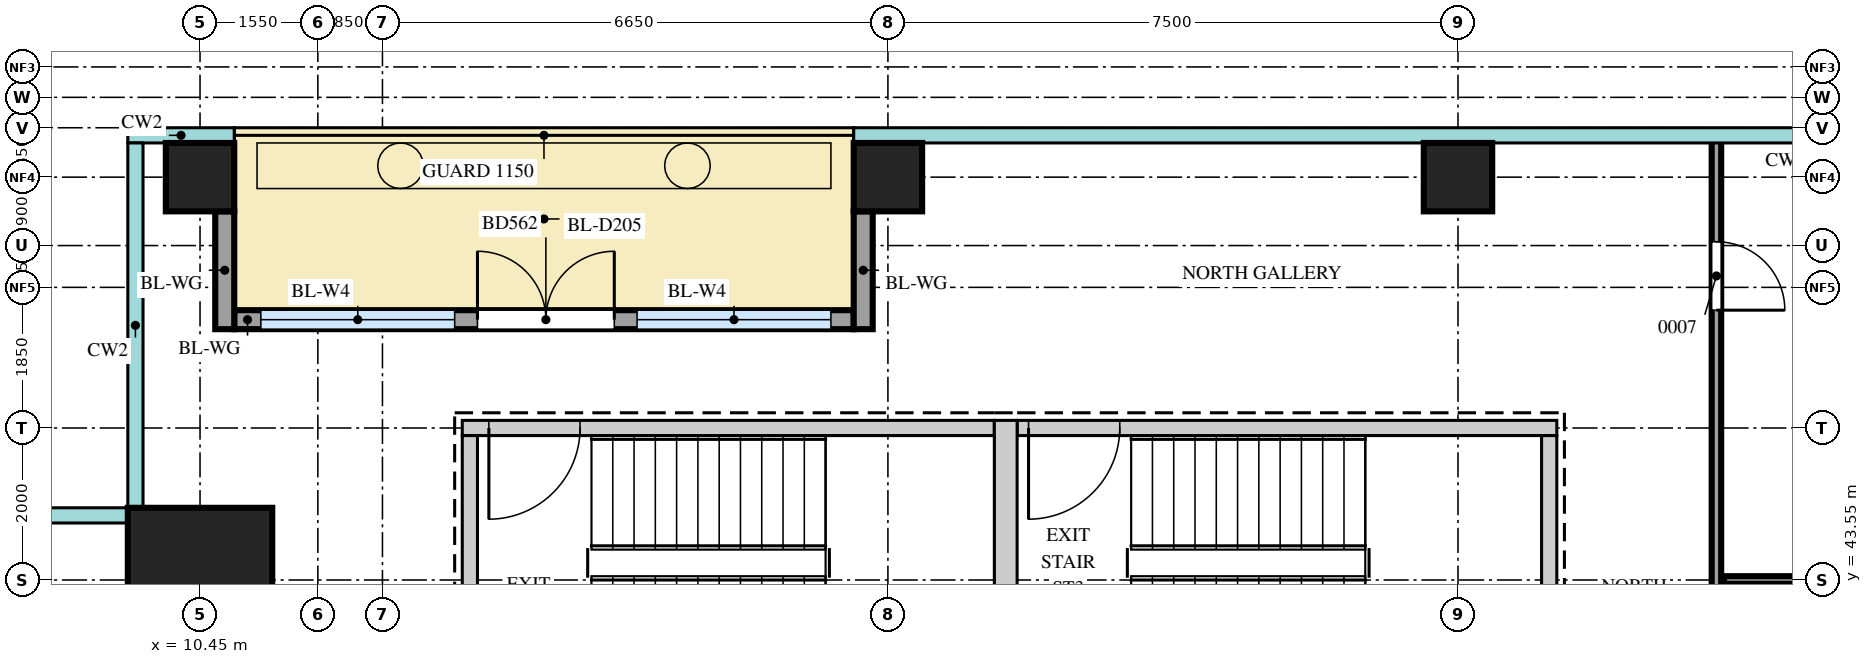
"""IFC4 building model, lengths in metres.
Left out: names, types, materials, properties, quantities, classifications, styles, units other than length and angle.
Written with IfcOpenShell. Run it as: python <this file> out.ifc"""

import sys

from ifc_helpers import new_model, si_unit, direction, frame, frame_2d, origin, origin_2d, place, context, subcontext, project, spatial, rectangle, extrude, source, transform, mapped, element, fill, save


model = new_model("IFC4")
c1 = context("Model", 3, precision=1e-05, world=origin(), true_north=direction((0.0, 1.0)))
c2 = subcontext(c1, "Body", "Model", "MODEL_VIEW")
j1 = project(units=[si_unit("LENGTHUNIT", "METRE"), si_unit("PLANEANGLEUNIT", "RADIAN")], contexts=[c1])
p1 = place(None, origin())
s1 = spatial("IfcSite", under=j1, at=p1, CompositionType="ELEMENT")
p2 = place(p1, origin())
s2 = spatial("IfcBuilding", under=s1, at=p2, CompositionType="ELEMENT")
p3 = place(p2, frame((0.0, 0.0, 250.2)))
s3 = spatial("IfcBuildingStorey", under=s2, at=p3, CompositionType="ELEMENT", Elevation=250.2)
m1 = source(origin(), c2, "Body", "SweptSolid", [
    extrude(rectangle(XDim=7.0, YDim=0.2, at=frame_2d((3.5, 0.0))), origin(), (0.0, 0.0, 1.0), 3.75),
])
p4 = place(p3, frame((13.9, 45.55, 0.0), z_axis=(0.0, 0.0, 1.0), x_axis=(1.0, 0.0, 0.0)))
e1 = element("IfcWall", 1, at=p4, inside=s3, PredefinedType="SHEAR", context=c2, shape_type="MappedRepresentation", body=[
    mapped(m1, transform((0.0, 0.0, 0.0))),
])
m2 = source(origin(), c2, "Body", "SweptSolid", [
    extrude(rectangle(XDim=1.2, YDim=2.1, at=frame_2d((0.6, 1.05))), frame((0.0, 0.11, 0.0), z_axis=(0.0, -1.0, 0.0), x_axis=(1.0, 0.0, 0.0)), (0.0, 0.0, 1.0), 0.22),
])
p5 = place(p4, frame((0.35, 0.0, 0.0)))
e2 = element("IfcOpeningElement", 2, at=p5, cuts=e1, PredefinedType="OPENING", context=c2, shape_type="MappedRepresentation", body=[
    mapped(m2, transform((0.0, 0.0, 0.0))),
])
m3 = source(origin(), c2, "Body", "SweptSolid", [
    extrude(rectangle(XDim=7.1, YDim=0.2, at=frame_2d((3.55, 0.0))), origin(), (0.0, 0.0, 1.0), 3.75),
])
p6 = place(p3, frame((21.2, 45.55, 0.0), z_axis=(0.0, 0.0, 1.0), x_axis=(1.0, 0.0, 0.0)))
e3 = element("IfcWall", 3, at=p6, inside=s3, PredefinedType="SHEAR", context=c2, shape_type="MappedRepresentation", body=[
    mapped(m3, transform((0.0, 0.0, 0.0))),
])
p7 = place(p6, frame((0.15, 0.0, 0.0)))
e4 = element("IfcOpeningElement", 4, at=p7, cuts=e3, PredefinedType="OPENING", context=c2, shape_type="MappedRepresentation", body=[
    mapped(m2, transform((0.0, 0.0, 0.0))),
])
m4 = source(origin(), c2, "Body", "SweptSolid", [
    extrude(rectangle(XDim=3.75, YDim=0.3, at=frame_2d((1.875, 0.0))), origin(), (0.0, 0.0, 1.0), 3.75),
])
p8 = place(p3, frame((21.05, 41.9, 0.0), z_axis=(0.0, 0.0, 1.0), x_axis=(0.0, 1.0, 0.0)))
e5 = element("IfcWall", 5, at=p8, inside=s3, PredefinedType="SHEAR", context=c2, shape_type="MappedRepresentation", body=[
    mapped(m4, transform((0.0, 0.0, 0.0))),
])
m5 = source(origin(), c2, "Body", "SweptSolid", [
    extrude(rectangle(XDim=3.35, YDim=0.2, at=frame_2d((1.675, 0.0))), origin(), (0.0, 0.0, 1.0), 3.75),
])
for number, where, z_axis, x_axis in (
    (6, (14.0, 42.1, 0.0), (0.0, 0.0, 1.0), (0.0, 1.0, 0.0)),
    (7, (28.2, 42.1, 0.0), (0.0, 0.0, 1.0), (0.0, 1.0, 0.0)),
):
    element("IfcWall", number, at=place(p3, frame(where, z_axis=z_axis, x_axis=x_axis)), inside=s3, PredefinedType="SHEAR", context=c2, shape_type="MappedRepresentation", body=[
        mapped(m5, transform((0.0, 0.0, 0.0))),
    ])
m6 = source(origin(), c2, "Body", "SweptSolid", [
    extrude(rectangle(XDim=1.9, YDim=1.9, at=origin_2d()), origin(), (0.0, 0.0, 1.0), 4.0),
])
p9 = place(p3, frame((10.45, 43.55, 0.0), z_axis=(0.0, 0.0, 1.0), x_axis=(1.0, 0.0, 0.0)))
e8 = element("IfcColumn", 8, at=p9, inside=s3, PredefinedType="COLUMN", context=c2, shape_type="MappedRepresentation", body=[
    mapped(m6, transform((0.0, 0.0, 0.0))),
])
m7 = source(origin(), c2, "Body", "SweptSolid", [
    extrude(rectangle(XDim=0.9, YDim=0.9, at=origin_2d()), origin(), (0.0, 0.0, 1.0), 3.75),
])
for number, where, z_axis, x_axis in (
    (9, (10.45, 48.85, 0.0), (0.0, 0.0, 1.0), (1.0, 0.0, 0.0)),
    (10, (19.5, 48.85, 0.0), (0.0, 0.0, 1.0), (1.0, 0.0, 0.0)),
    (11, (27.0, 48.85, 0.0), (0.0, 0.0, 1.0), (1.0, 0.0, 0.0)),
):
    element("IfcColumn", number, at=place(p3, frame(where, z_axis=z_axis, x_axis=x_axis)), inside=s3, PredefinedType="COLUMN", context=c2, shape_type="MappedRepresentation", body=[
        mapped(m7, transform((0.0, 0.0, 0.0))),
    ])
m8 = source(origin(), c2, "Body", "SweptSolid", [
    extrude(rectangle(XDim=8.15, YDim=0.25, at=frame_2d((4.075, 0.0))), origin(), (0.0, 0.0, 1.0), 3.35),
])
p10 = place(p3, frame((10.9, 46.975, 0.0), z_axis=(0.0, 0.0, 1.0), x_axis=(1.0, 0.0, 0.0)))
e12 = element("IfcWall", 12, at=p10, inside=s3, PredefinedType="SOLIDWALL", context=c2, shape_type="MappedRepresentation", body=[
    mapped(m8, transform((0.0, 0.0, 0.0))),
])
m9 = source(origin(), c2, "Body", "SweptSolid", [
    extrude(rectangle(XDim=2.55, YDim=2.4, at=frame_2d((1.275, 1.2))), frame((0.0, 0.135, 0.0), z_axis=(0.0, -1.0, 0.0), x_axis=(1.0, 0.0, 0.0)), (0.0, 0.0, 1.0), 0.27),
])
p11 = place(p10, frame((0.35, 0.0, 0.0)))
e13 = element("IfcOpeningElement", 13, at=p11, cuts=e12, PredefinedType="OPENING", context=c2, shape_type="MappedRepresentation", body=[
    mapped(m9, transform((0.0, 0.0, 0.0))),
])
p12 = place(p10, frame((5.3, 0.0, 0.0)))
e14 = element("IfcOpeningElement", 14, at=p12, cuts=e12, PredefinedType="OPENING", context=c2, shape_type="MappedRepresentation", body=[
    mapped(m9, transform((0.0, 0.0, 0.0))),
])
m10 = source(origin(), c2, "Body", "SweptSolid", [
    extrude(rectangle(XDim=1.8, YDim=2.4, at=frame_2d((0.9, 1.2))), frame((0.0, 0.135, 0.0), z_axis=(0.0, -1.0, 0.0), x_axis=(1.0, 0.0, 0.0)), (0.0, 0.0, 1.0), 0.27),
])
p13 = place(p10, frame((3.2, 0.0, 0.0)))
e15 = element("IfcOpeningElement", 15, at=p13, cuts=e12, PredefinedType="OPENING", context=c2, shape_type="MappedRepresentation", body=[
    mapped(m10, transform((0.0, 0.0, 0.0))),
])
m11 = source(origin(), c2, "Body", "SweptSolid", [
    extrude(rectangle(XDim=1.55, YDim=0.25, at=frame_2d((0.775, 0.0))), origin(), (0.0, 0.0, 1.0), 3.35),
])
for number, where, z_axis, x_axis in (
    (16, (10.775, 48.4, 0.0), (0.0, 0.0, 1.0), (0.0, -1.0, 0.0)),
    (17, (19.175, 48.4, 0.0), (0.0, 0.0, 1.0), (0.0, -1.0, 0.0)),
):
    element("IfcWall", number, at=place(p3, frame(where, z_axis=z_axis, x_axis=x_axis)), inside=s3, PredefinedType="SOLIDWALL", context=c2, shape_type="MappedRepresentation", body=[
        mapped(m11, transform((0.0, 0.0, 0.0))),
    ])
m12 = source(origin(), c2, "Body", "SweptSolid", [
    extrude(rectangle(XDim=10.25, YDim=0.125, at=frame_2d((5.125, 0.0))), origin(), (0.0, 0.0, 1.0), 3.8),
])
p14 = place(p3, frame((30.4, 39.1, 0.0), z_axis=(0.0, 0.0, 1.0), x_axis=(0.0, 1.0, 0.0)))
e18 = element("IfcWall", 18, at=p14, inside=s3, PredefinedType="PARTITIONING", context=c2, shape_type="MappedRepresentation", body=[
    mapped(m12, transform((0.0, 0.0, 0.0))),
])
m13 = source(origin(), c2, "Body", "SweptSolid", [
    extrude(rectangle(XDim=0.9, YDim=2.1, at=frame_2d((0.45, 1.05))), frame((0.0, 0.073, 0.0), z_axis=(0.0, -1.0, 0.0), x_axis=(1.0, 0.0, 0.0)), (0.0, 0.0, 1.0), 0.145),
])
p15 = place(p14, frame((8.0, 0.0, 0.0)))
e19 = element("IfcOpeningElement", 19, at=p15, cuts=e18, PredefinedType="OPENING", context=c2, shape_type="MappedRepresentation", body=[
    mapped(m13, transform((0.0, 0.0, 0.0))),
])
m14 = source(origin(), c2, "Body", "SweptSolid", [
    extrude(rectangle(XDim=18.85, YDim=0.1, at=frame_2d((9.425, 0.0))), origin(), (0.0, 0.0, 1.0), 3.3),
])
p16 = place(p3, frame((30.5, 43.55, 0.0), z_axis=(0.0, 0.0, 1.0), x_axis=(1.0, 0.0, 0.0)))
e20 = element("IfcWall", 20, at=p16, inside=s3, PredefinedType="PARTITIONING", context=c2, shape_type="MappedRepresentation", body=[
    mapped(m14, transform((0.0, 0.0, 0.0))),
])
m15 = source(origin(), c2, "Body", "SweptSolid", [
    extrude(rectangle(XDim=2.55, YDim=2.4, at=frame_2d((1.275, 1.2))), frame((0.0, 0.03, 0.0), z_axis=(0.0, -1.0, 0.0), x_axis=(1.0, 0.0, 0.0)), (0.0, 0.0, 1.0), 0.06),
])
p17 = place(p11, origin())
e21 = element("IfcWindow", 21, at=p17, inside=s3, PartitioningType="SINGLE_PANEL", PredefinedType="WINDOW", context=c2, shape_type="MappedRepresentation", body=[
    mapped(m15, transform((0.0, 0.0, 0.0))),
])
fill(e13, e21)
p18 = place(p12, origin())
e22 = element("IfcWindow", 22, at=p18, inside=s3, PartitioningType="SINGLE_PANEL", PredefinedType="WINDOW", context=c2, shape_type="MappedRepresentation", body=[
    mapped(m15, transform((0.0, 0.0, 0.0))),
])
fill(e14, e22)
m16 = source(origin(), c2, "Body", "SweptSolid", [
    extrude(rectangle(XDim=1.8, YDim=2.4, at=frame_2d((0.9, 1.2))), frame((0.0, 0.025, 0.0), z_axis=(0.0, -1.0, 0.0), x_axis=(1.0, 0.0, 0.0)), (0.0, 0.0, 1.0), 0.05),
])
p19 = place(p13, origin())
e23 = element("IfcDoor", 23, at=p19, inside=s3, OperationType="DOUBLE_DOOR_DOUBLE_SWING", PredefinedType="DOOR", context=c2, shape_type="MappedRepresentation", body=[
    mapped(m16, transform((0.0, 0.0, 0.0))),
])
fill(e15, e23)
m17 = source(origin(), c2, "Body", "SweptSolid", [
    extrude(rectangle(XDim=0.9, YDim=2.1, at=frame_2d((0.45, 1.05))), frame((0.0, 0.025, 0.0), z_axis=(0.0, -1.0, 0.0), x_axis=(1.0, 0.0, 0.0)), (0.0, 0.0, 1.0), 0.05),
])
p20 = place(p15, origin())
e24 = element("IfcDoor", 24, at=p20, inside=s3, OperationType="SINGLE_SWING_LEFT", PredefinedType="DOOR", context=c2, shape_type="MappedRepresentation", body=[
    mapped(m17, transform((0.0, 0.0, 0.0))),
])
fill(e19, e24)
m18 = source(origin(), c2, "Body", "SweptSolid", [
    extrude(rectangle(XDim=1.2, YDim=2.1, at=frame_2d((0.6, 1.05))), frame((0.0, 0.025, 0.0), z_axis=(0.0, -1.0, 0.0), x_axis=(1.0, 0.0, 0.0)), (0.0, 0.0, 1.0), 0.05),
])
p21 = place(p5, origin())
e25 = element("IfcDoor", 25, at=p21, inside=s3, OperationType="SINGLE_SWING_LEFT", PredefinedType="DOOR", context=c2, shape_type="MappedRepresentation", body=[
    mapped(m18, transform((0.0, 0.0, 0.0))),
])
fill(e2, e25)
p22 = place(p7, origin())
e26 = element("IfcDoor", 26, at=p22, inside=s3, OperationType="SINGLE_SWING_LEFT", PredefinedType="DOOR", context=c2, shape_type="MappedRepresentation", body=[
    mapped(m18, transform((0.0, 0.0, 0.0))),
])
fill(e4, e26)
save(model, sys.argv[1])
